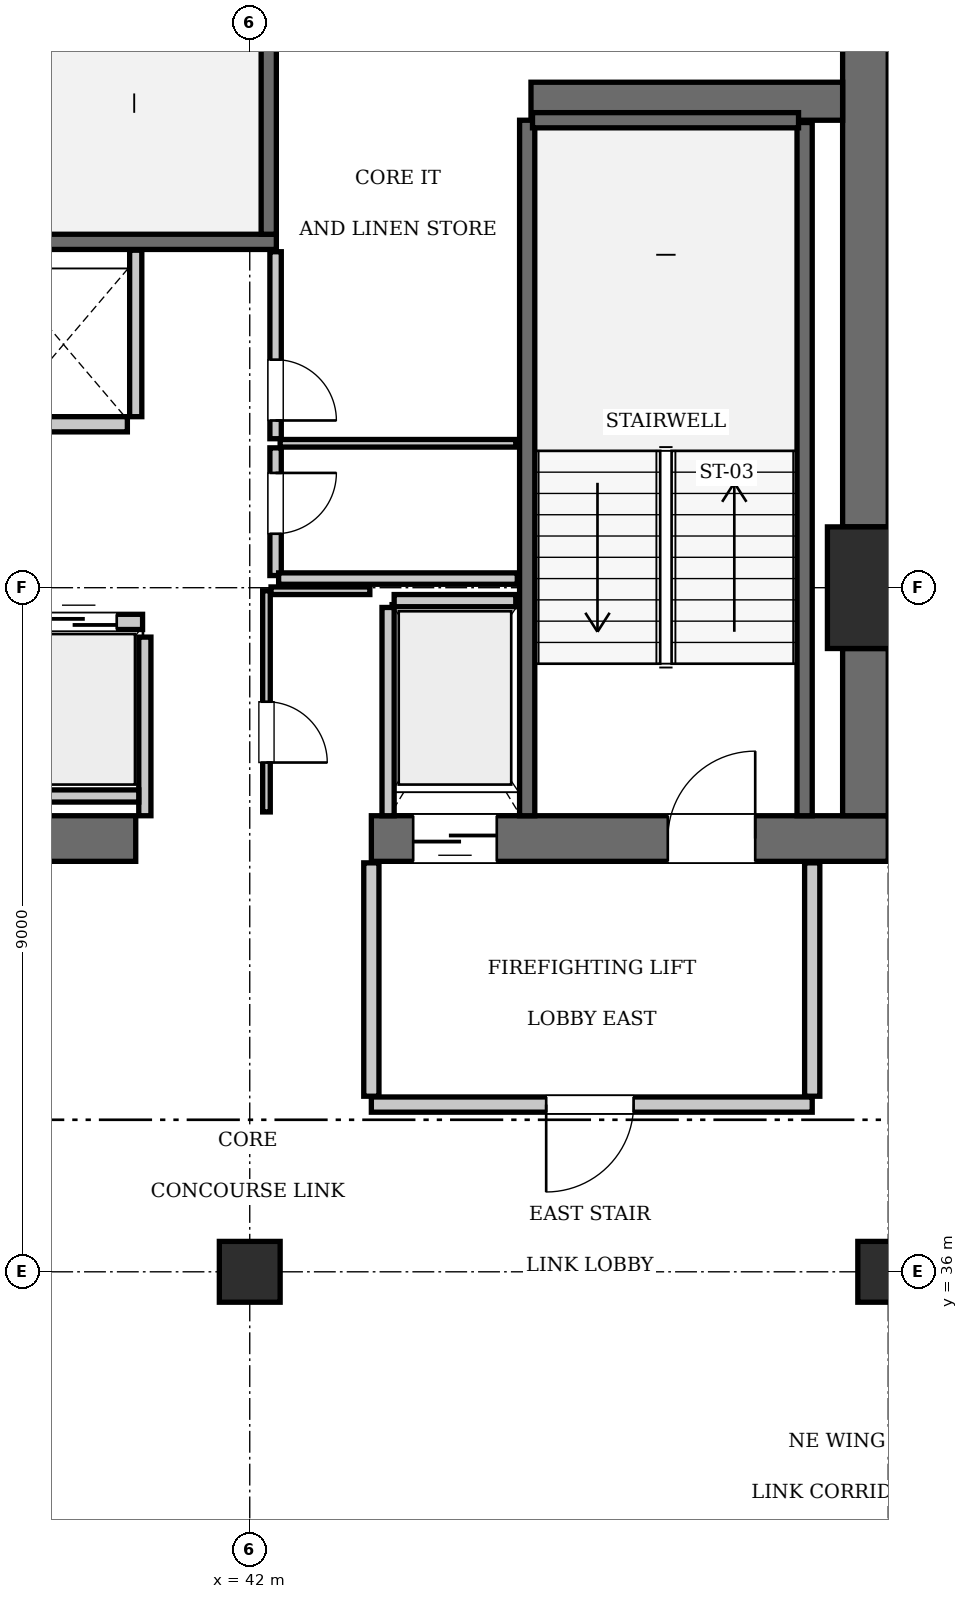
"""IFC4 building model, lengths in metres.
Left out: names, types, materials, properties, quantities, classifications, styles, units other than length and angle.
Written with IfcOpenShell. Run it as: python <this file> out.ifc"""

import sys

from ifc_helpers import new_model, si_unit, direction, frame, frame_2d, origin, origin_2d, place, context, subcontext, project, spatial, rectangle, extrude, element, fill, save


model = new_model("IFC4")
c1 = context("Model", 3, precision=1e-05, world=origin(), true_north=direction((0.0, 1.0)))
c2 = subcontext(c1, "Body", "Model", "MODEL_VIEW")
j1 = project(units=[si_unit("LENGTHUNIT", "METRE"), si_unit("PLANEANGLEUNIT", "RADIAN")], contexts=[c1])
p1 = place(None, origin())
s1 = spatial("IfcSite", under=j1, at=p1, CompositionType="ELEMENT")
p2 = place(p1, origin())
s2 = spatial("IfcBuilding", under=s1, at=p2, CompositionType="ELEMENT")
p3 = place(p2, frame((0.0, 0.0, 250.95)))
s3 = spatial("IfcBuildingStorey", under=s2, at=p3, CompositionType="ELEMENT", Elevation=250.95)
p4 = place(p3, frame((50.4, 45.0, 0.0), z_axis=(0.0, 0.0, 1.0), x_axis=(1.0, 0.0, 0.0)))
e1 = element("IfcColumn", 1, at=p4, inside=s3, PredefinedType="COLUMN", context=c2, shape_type="SweptSolid", body=[
    extrude(rectangle(XDim=1.6, YDim=1.6, at=origin_2d()), origin(), (0.0, 0.0, 1.0), 3.85),
])
p5 = place(p3, frame((35.1, 41.7, 0.0), z_axis=(0.0, 0.0, 1.0), x_axis=(1.0, 0.0, 0.0)))
e2 = element("IfcWall", 2, at=p5, inside=s3, PredefinedType="SHEAR", context=c2, shape_type="SweptSolid", body=[
    extrude(rectangle(XDim=5.4, YDim=0.6, at=frame_2d((2.7, 0.0))), origin(), (0.0, 0.0, 1.0), 3.85),
])
p6 = place(p3, frame((43.6, 41.7, 0.0), z_axis=(0.0, 0.0, 1.0), x_axis=(1.0, 0.0, 0.0)))
e3 = element("IfcWall", 3, at=p6, inside=s3, PredefinedType="SHEAR", context=c2, shape_type="SweptSolid", body=[
    extrude(rectangle(XDim=6.8, YDim=0.6, at=frame_2d((3.4, 0.0))), origin(), (0.0, 0.0, 1.0), 3.85),
])
p7 = place(p6, frame((3.9, 0.0, 0.0)))
e4 = element("IfcOpeningElement", 4, at=p7, cuts=e3, PredefinedType="OPENING", context=c2, shape_type="SweptSolid", body=[
    extrude(rectangle(XDim=1.15, YDim=2.15, at=frame_2d((0.575, 1.075))), frame((0.0, 0.31, 0.0), z_axis=(0.0, -1.0, 0.0), x_axis=(1.0, 0.0, 0.0)), (0.0, 0.0, 1.0), 0.62),
])
p8 = place(p6, frame((0.55, 0.0, 0.0)))
e5 = element("IfcOpeningElement", 5, at=p8, cuts=e3, PredefinedType="OPENING", context=c2, shape_type="SweptSolid", body=[
    extrude(rectangle(XDim=1.1, YDim=2.2, at=frame_2d((0.55, 1.1))), frame((0.0, 0.31, 0.0), z_axis=(0.0, -1.0, 0.0), x_axis=(1.0, 0.0, 0.0)), (0.0, 0.0, 1.0), 0.62),
])
p9 = place(p3, frame((50.1, 42.0, 0.0), z_axis=(0.0, 0.0, 1.0), x_axis=(0.0, 1.0, 0.0)))
e6 = element("IfcWall", 6, at=p9, inside=s3, PredefinedType="SHEAR", context=c2, shape_type="SweptSolid", body=[
    extrude(rectangle(XDim=2.2, YDim=0.6, at=frame_2d((1.1, 0.0))), origin(), (0.0, 0.0, 1.0), 3.85),
])
p10 = place(p3, frame((50.1, 45.8, 0.0), z_axis=(0.0, 0.0, 1.0), x_axis=(0.0, 1.0, 0.0)))
e7 = element("IfcWall", 7, at=p10, inside=s3, PredefinedType="SHEAR", context=c2, shape_type="SweptSolid", body=[
    extrude(rectangle(XDim=7.6, YDim=0.6, at=frame_2d((3.8, 0.0))), origin(), (0.0, 0.0, 1.0), 3.85),
])
p11 = place(p3, frame((45.7, 51.4, 0.0), z_axis=(0.0, 0.0, 1.0), x_axis=(1.0, 0.0, 0.0)))
e8 = element("IfcWall", 8, at=p11, inside=s3, PredefinedType="SHEAR", context=c2, shape_type="SweptSolid", body=[
    extrude(rectangle(XDim=4.1, YDim=0.5, at=frame_2d((2.05, 0.0))), origin(), (0.0, 0.0, 1.0), 3.85),
])
for number, where, z_axis, x_axis in (
    (9, (42.0, 36.0, 0.0), (0.0, 0.0, 1.0), (1.0, 0.0, 0.0)),
    (10, (50.4, 36.0, 0.0), (0.0, 0.0, 1.0), (1.0, 0.0, 0.0)),
):
    element("IfcColumn", number, at=place(p3, frame(where, z_axis=z_axis, x_axis=x_axis)), inside=s3, PredefinedType="COLUMN", context=c2, shape_type="SweptSolid", body=[
        extrude(rectangle(XDim=0.8, YDim=0.8, at=origin_2d()), origin(), (0.0, 0.0, 1.0), 3.85),
    ])
p12 = place(p3, frame((33.25, 49.55, 0.0), z_axis=(0.0, 0.0, 1.0), x_axis=(1.0, 0.0, 0.0)))
e11 = element("IfcWall", 11, at=p12, inside=s3, PredefinedType="SOLIDWALL", context=c2, shape_type="SweptSolid", body=[
    extrude(rectangle(XDim=9.1, YDim=0.2, at=frame_2d((4.55, 0.0))), origin(), (0.0, 0.0, 1.0), 3.61),
])
p13 = place(p3, frame((42.25, 49.65, 0.0), z_axis=(0.0, 0.0, 1.0), x_axis=(0.0, 1.0, 0.0)))
e12 = element("IfcWall", 12, at=p13, inside=s3, PredefinedType="SOLIDWALL", context=c2, shape_type="SweptSolid", body=[
    extrude(rectangle(XDim=3.75, YDim=0.2, at=frame_2d((1.875, 0.0))), origin(), (0.0, 0.0, 1.0), 3.61),
])
p14 = place(p3, frame((45.65, 42.0, 0.0), z_axis=(0.0, 0.0, 1.0), x_axis=(0.0, 1.0, 0.0)))
e13 = element("IfcWall", 13, at=p14, inside=s3, PredefinedType="SOLIDWALL", context=c2, shape_type="SweptSolid", body=[
    extrude(rectangle(XDim=9.15, YDim=0.2, at=frame_2d((4.575, 0.0))), origin(), (0.0, 0.0, 1.0), 3.61),
])
p15 = place(p3, frame((49.3, 42.0, 0.0), z_axis=(0.0, 0.0, 1.0), x_axis=(0.0, 1.0, 0.0)))
e14 = element("IfcWall", 14, at=p15, inside=s3, PredefinedType="SOLIDWALL", context=c2, shape_type="SweptSolid", body=[
    extrude(rectangle(XDim=9.12, YDim=0.2, at=frame_2d((4.56, 0.0))), origin(), (0.0, 0.0, 1.0), 3.61),
])
p16 = place(p3, frame((45.72, 51.15, 0.0), z_axis=(0.0, 0.0, 1.0), x_axis=(1.0, 0.0, 0.0)))
e15 = element("IfcWall", 15, at=p16, inside=s3, PredefinedType="SOLIDWALL", context=c2, shape_type="SweptSolid", body=[
    extrude(rectangle(XDim=3.5, YDim=0.2, at=frame_2d((1.75, 0.0))), origin(), (0.0, 0.0, 1.0), 3.61),
])
p17 = place(p3, frame((38.91, 44.55, 0.0), z_axis=(0.0, 0.0, 1.0), x_axis=(1.0, 0.0, 0.0)))
e16 = element("IfcWall", 16, at=p17, inside=s3, PredefinedType="SOLIDWALL", context=c2, shape_type="SweptSolid", body=[
    extrude(rectangle(XDim=1.68, YDim=0.2, at=frame_2d((0.84, 0.0))), origin(), (0.0, 0.0, 1.0), 3.61),
])
p18 = place(p17, frame((0.34, 0.0, 0.0)))
e17 = element("IfcOpeningElement", 17, at=p18, cuts=e16, PredefinedType="OPENING", context=c2, shape_type="SweptSolid", body=[
    extrude(rectangle(XDim=1.0, YDim=2.15, at=frame_2d((0.5, 1.075))), frame((0.0, 0.11, 0.0), z_axis=(0.0, -1.0, 0.0), x_axis=(1.0, 0.0, 0.0)), (0.0, 0.0, 1.0), 0.22),
])
p19 = place(p3, frame((38.71, 47.15, 0.0), z_axis=(0.0, 0.0, 1.0), x_axis=(1.0, 0.0, 0.0)))
e18 = element("IfcWall", 18, at=p19, inside=s3, PredefinedType="SOLIDWALL", context=c2, shape_type="SweptSolid", body=[
    extrude(rectangle(XDim=1.68, YDim=0.2, at=frame_2d((0.84, 0.0))), origin(), (0.0, 0.0, 1.0), 3.61),
])
p20 = place(p3, frame((43.9, 44.83, 0.0), z_axis=(0.0, 0.0, 1.0), x_axis=(1.0, 0.0, 0.0)))
e19 = element("IfcWall", 19, at=p20, inside=s3, PredefinedType="SOLIDWALL", context=c2, shape_type="SweptSolid", body=[
    extrude(rectangle(XDim=1.6, YDim=0.16, at=frame_2d((0.8, 0.0))), origin(), (0.0, 0.0, 1.0), 3.61),
])
p21 = place(p3, frame((43.82, 42.0, 0.0), z_axis=(0.0, 0.0, 1.0), x_axis=(0.0, 1.0, 0.0)))
e20 = element("IfcWall", 20, at=p21, inside=s3, PredefinedType="SOLIDWALL", context=c2, shape_type="SweptSolid", body=[
    extrude(rectangle(XDim=2.74, YDim=0.16, at=frame_2d((1.37, 0.0))), origin(), (0.0, 0.0, 1.0), 3.61),
])
p22 = place(p3, frame((40.62, 42.0, 0.0), z_axis=(0.0, 0.0, 1.0), x_axis=(0.0, 1.0, 0.0)))
e21 = element("IfcWall", 21, at=p22, inside=s3, PredefinedType="SOLIDWALL", context=c2, shape_type="SweptSolid", body=[
    extrude(rectangle(XDim=2.35, YDim=0.16, at=frame_2d((1.175, 0.0))), origin(), (0.0, 0.0, 1.0), 3.61),
])
p23 = place(p3, frame((35.52, 42.26, 0.0), z_axis=(0.0, 0.0, 1.0), x_axis=(1.0, 0.0, 0.0)))
e22 = element("IfcWall", 22, at=p23, inside=s3, PredefinedType="SOLIDWALL", context=c2, shape_type="SweptSolid", body=[
    extrude(rectangle(XDim=5.02, YDim=0.16, at=frame_2d((2.51, 0.0))), origin(), (0.0, 0.0, 1.0), 3.61),
])
p24 = place(p3, frame((40.5, 47.25, 0.0), z_axis=(0.0, 0.0, 1.0), x_axis=(0.0, 1.0, 0.0)))
e23 = element("IfcWall", 23, at=p24, inside=s3, PredefinedType="SOLIDWALL", context=c2, shape_type="SweptSolid", body=[
    extrude(rectangle(XDim=2.19, YDim=0.16, at=frame_2d((1.095, 0.0))), origin(), (0.0, 0.0, 1.0), 3.61),
])
p25 = place(p3, frame((43.6, 38.2, 0.0), z_axis=(0.0, 0.0, 1.0), x_axis=(1.0, 0.0, 0.0)))
e24 = element("IfcWall", 24, at=p25, inside=s3, PredefinedType="PARTITIONING", context=c2, shape_type="SweptSolid", body=[
    extrude(rectangle(XDim=5.8, YDim=0.2, at=frame_2d((2.9, 0.0))), origin(), (0.0, 0.0, 1.0), 3.61),
])
p26 = place(p25, frame((2.3, 0.0, 0.0)))
e25 = element("IfcOpeningElement", 25, at=p26, cuts=e24, PredefinedType="OPENING", context=c2, shape_type="SweptSolid", body=[
    extrude(rectangle(XDim=1.15, YDim=2.15, at=frame_2d((0.575, 1.075))), frame((0.0, 0.11, 0.0), z_axis=(0.0, -1.0, 0.0), x_axis=(1.0, 0.0, 0.0)), (0.0, 0.0, 1.0), 0.22),
])
for number, where, z_axis, x_axis in (
    (26, (43.6, 38.31, 0.0), (0.0, 0.0, 1.0), (0.0, 1.0, 0.0)),
    (27, (49.4, 38.31, 0.0), (0.0, 0.0, 1.0), (0.0, 1.0, 0.0)),
):
    element("IfcWall", number, at=place(p3, frame(where, z_axis=z_axis, x_axis=x_axis)), inside=s3, PredefinedType="PARTITIONING", context=c2, shape_type="SweptSolid", body=[
        extrude(rectangle(XDim=3.07, YDim=0.2, at=frame_2d((1.535, 0.0))), origin(), (0.0, 0.0, 1.0), 3.61),
    ])
p27 = place(p3, frame((42.22, 42.05, 0.0), z_axis=(0.0, 0.0, 1.0), x_axis=(0.0, 1.0, 0.0)))
e28 = element("IfcWall", 28, at=p27, inside=s3, PredefinedType="PARTITIONING", context=c2, shape_type="SweptSolid", body=[
    extrude(rectangle(XDim=2.91, YDim=0.1, at=frame_2d((1.455, 0.0))), origin(), (0.0, 0.0, 1.0), 3.61),
])
p28 = place(p27, frame((0.65, 0.0, 0.0)))
e29 = element("IfcOpeningElement", 29, at=p28, cuts=e28, PredefinedType="OPENING", context=c2, shape_type="SweptSolid", body=[
    extrude(rectangle(XDim=0.8, YDim=2.05, at=frame_2d((0.4, 1.025))), frame((0.0, 0.06, 0.0), z_axis=(0.0, -1.0, 0.0), x_axis=(1.0, 0.0, 0.0)), (0.0, 0.0, 1.0), 0.12),
])
p29 = place(p3, frame((42.28, 44.96, 0.0), z_axis=(0.0, 0.0, 1.0), x_axis=(1.0, 0.0, 0.0)))
e30 = element("IfcWall", 30, at=p29, inside=s3, PredefinedType="PARTITIONING", context=c2, shape_type="SweptSolid", body=[
    extrude(rectangle(XDim=1.3, YDim=0.1, at=frame_2d((0.65, 0.0))), origin(), (0.0, 0.0, 1.0), 3.61),
])
p30 = place(p3, frame((42.34, 45.16, 0.0), z_axis=(0.0, 0.0, 1.0), x_axis=(0.0, 1.0, 0.0)))
e31 = element("IfcWall", 31, at=p30, inside=s3, PredefinedType="PARTITIONING", context=c2, shape_type="SweptSolid", body=[
    extrude(rectangle(XDim=1.68, YDim=0.15, at=frame_2d((0.84, 0.0))), origin(), (0.0, 0.0, 1.0), 3.61),
])
p31 = place(p30, frame((0.55, 0.0, 0.0)))
e32 = element("IfcOpeningElement", 32, at=p31, cuts=e31, PredefinedType="OPENING", context=c2, shape_type="SweptSolid", body=[
    extrude(rectangle(XDim=0.8, YDim=2.05, at=frame_2d((0.4, 1.025))), frame((0.0, 0.085, 0.0), z_axis=(0.0, -1.0, 0.0), x_axis=(1.0, 0.0, 0.0)), (0.0, 0.0, 1.0), 0.17),
])
p32 = place(p3, frame((42.34, 46.96, 0.0), z_axis=(0.0, 0.0, 1.0), x_axis=(0.0, 1.0, 0.0)))
e33 = element("IfcWall", 33, at=p32, inside=s3, PredefinedType="PARTITIONING", context=c2, shape_type="SweptSolid", body=[
    extrude(rectangle(XDim=2.46, YDim=0.15, at=frame_2d((1.23, 0.0))), origin(), (0.0, 0.0, 1.0), 3.61),
])
p33 = place(p32, frame((0.24, 0.0, 0.0)))
e34 = element("IfcOpeningElement", 34, at=p33, cuts=e33, PredefinedType="OPENING", context=c2, shape_type="SweptSolid", body=[
    extrude(rectangle(XDim=0.8, YDim=2.05, at=frame_2d((0.4, 1.025))), frame((0.0, 0.085, 0.0), z_axis=(0.0, -1.0, 0.0), x_axis=(1.0, 0.0, 0.0)), (0.0, 0.0, 1.0), 0.17),
])
p34 = place(p3, frame((42.4, 46.9, 0.0), z_axis=(0.0, 0.0, 1.0), x_axis=(1.0, 0.0, 0.0)))
e35 = element("IfcWall", 35, at=p34, inside=s3, PredefinedType="PARTITIONING", context=c2, shape_type="SweptSolid", body=[
    extrude(rectangle(XDim=3.1, YDim=0.1, at=frame_2d((1.55, 0.0))), origin(), (0.0, 0.0, 1.0), 3.61),
])
p35 = place(p3, frame((42.38, 45.12, 0.0), z_axis=(0.0, 0.0, 1.0), x_axis=(1.0, 0.0, 0.0)))
e36 = element("IfcWall", 36, at=p35, inside=s3, PredefinedType="PARTITIONING", context=c2, shape_type="SweptSolid", body=[
    extrude(rectangle(XDim=3.14, YDim=0.15, at=frame_2d((1.57, 0.0))), origin(), (0.0, 0.0, 1.0), 3.61),
])
p36 = place(p7, origin())
e37 = element("IfcDoor", 37, at=p36, inside=s3, OperationType="SINGLE_SWING_RIGHT", PredefinedType="DOOR", context=c2, shape_type="SweptSolid", body=[
    extrude(rectangle(XDim=1.15, YDim=2.15, at=frame_2d((0.575, 1.075))), frame((0.0, 0.025, 0.0), z_axis=(0.0, -1.0, 0.0), x_axis=(1.0, 0.0, 0.0)), (0.0, 0.0, 1.0), 0.05),
])
fill(e4, e37)
p37 = place(p18, origin())
e38 = element("IfcDoor", 38, at=p37, inside=s3, OperationType="SLIDING_TO_LEFT", PredefinedType="DOOR", context=c2, shape_type="SweptSolid", body=[
    extrude(rectangle(XDim=1.0, YDim=2.15, at=frame_2d((0.5, 1.075))), frame((0.0, 0.025, 0.0), z_axis=(0.0, -1.0, 0.0), x_axis=(1.0, 0.0, 0.0)), (0.0, 0.0, 1.0), 0.05),
])
fill(e17, e38)
p38 = place(p8, frame((1.1, 0.0, 0.0), z_axis=(0.0, 0.0, 1.0), x_axis=(-1.0, 0.0, 0.0)))
e39 = element("IfcDoor", 39, at=p38, inside=s3, OperationType="SLIDING_TO_LEFT", PredefinedType="DOOR", context=c2, shape_type="SweptSolid", body=[
    extrude(rectangle(XDim=1.1, YDim=2.2, at=frame_2d((0.55, 1.1))), frame((0.0, 0.025, 0.0), z_axis=(0.0, -1.0, 0.0), x_axis=(1.0, 0.0, 0.0)), (0.0, 0.0, 1.0), 0.05),
])
fill(e5, e39)
p39 = place(p26, frame((1.15, 0.0, 0.0), z_axis=(0.0, 0.0, 1.0), x_axis=(-1.0, 0.0, 0.0)))
e40 = element("IfcDoor", 40, at=p39, inside=s3, OperationType="SINGLE_SWING_RIGHT", PredefinedType="DOOR", context=c2, shape_type="SweptSolid", body=[
    extrude(rectangle(XDim=1.15, YDim=2.15, at=frame_2d((0.575, 1.075))), frame((0.0, 0.025, 0.0), z_axis=(0.0, -1.0, 0.0), x_axis=(1.0, 0.0, 0.0)), (0.0, 0.0, 1.0), 0.05),
])
fill(e25, e40)
p40 = place(p28, frame((0.8, 0.0, 0.0), z_axis=(0.0, 0.0, 1.0), x_axis=(-1.0, 0.0, 0.0)))
e41 = element("IfcDoor", 41, at=p40, inside=s3, OperationType="SINGLE_SWING_RIGHT", PredefinedType="DOOR", context=c2, shape_type="SweptSolid", body=[
    extrude(rectangle(XDim=0.8, YDim=2.05, at=frame_2d((0.4, 1.025))), frame((0.0, 0.025, 0.0), z_axis=(0.0, -1.0, 0.0), x_axis=(1.0, 0.0, 0.0)), (0.0, 0.0, 1.0), 0.05),
])
fill(e29, e41)
p41 = place(p31, frame((0.8, 0.0, 0.0), z_axis=(0.0, 0.0, 1.0), x_axis=(-1.0, 0.0, 0.0)))
e42 = element("IfcDoor", 42, at=p41, inside=s3, OperationType="SINGLE_SWING_LEFT", PredefinedType="DOOR", context=c2, shape_type="SweptSolid", body=[
    extrude(rectangle(XDim=0.8, YDim=2.05, at=frame_2d((0.4, 1.025))), frame((0.0, 0.025, 0.0), z_axis=(0.0, -1.0, 0.0), x_axis=(1.0, 0.0, 0.0)), (0.0, 0.0, 1.0), 0.05),
])
fill(e32, e42)
p42 = place(p33, frame((0.8, 0.0, 0.0), z_axis=(0.0, 0.0, 1.0), x_axis=(-1.0, 0.0, 0.0)))
e43 = element("IfcDoor", 43, at=p42, inside=s3, OperationType="SINGLE_SWING_RIGHT", PredefinedType="DOOR", context=c2, shape_type="SweptSolid", body=[
    extrude(rectangle(XDim=0.8, YDim=2.05, at=frame_2d((0.4, 1.025))), frame((0.0, 0.025, 0.0), z_axis=(0.0, -1.0, 0.0), x_axis=(1.0, 0.0, 0.0)), (0.0, 0.0, 1.0), 0.05),
])
fill(e34, e43)
save(model, sys.argv[1])
